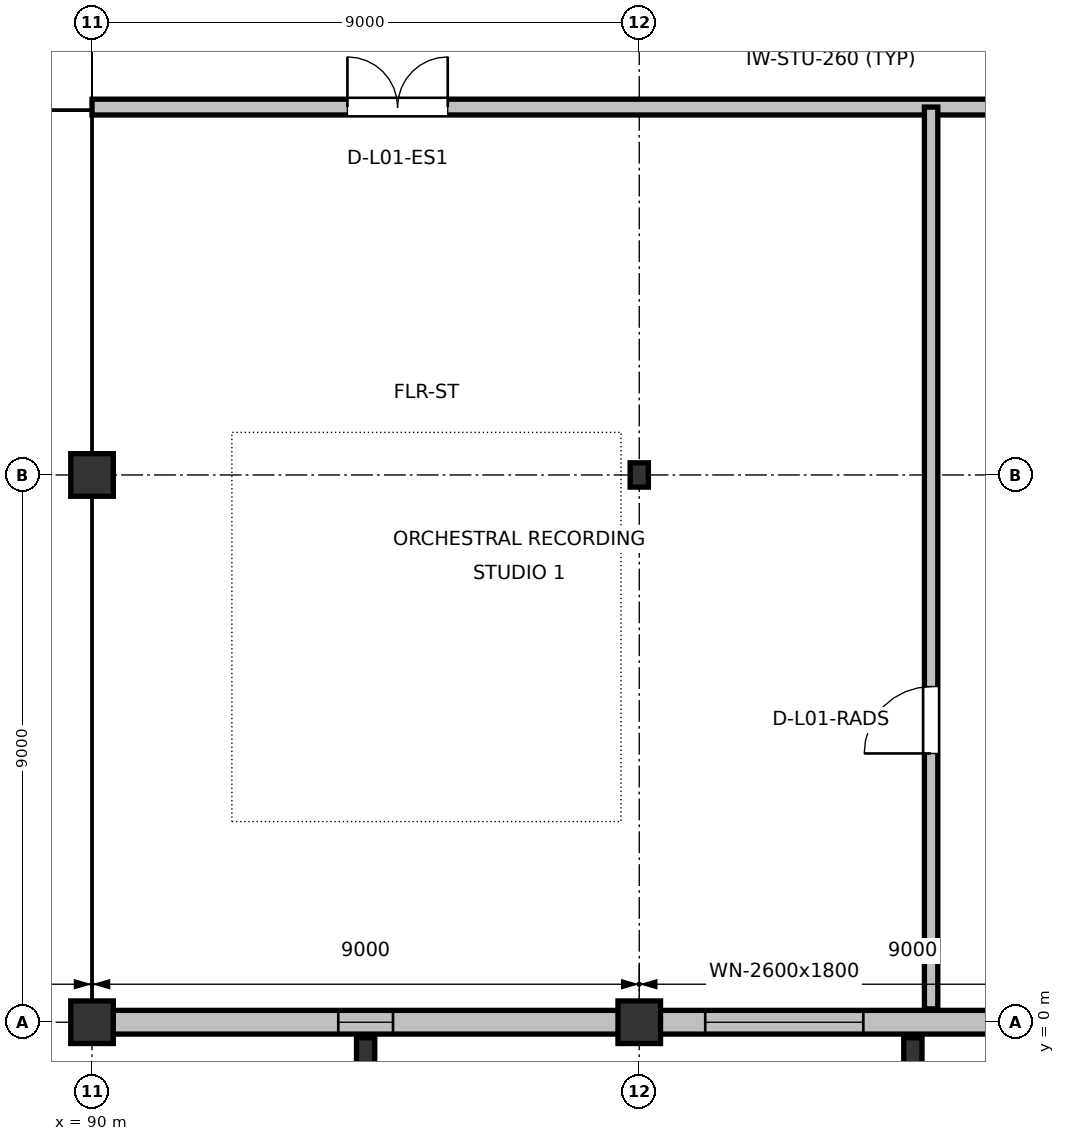
"""IFC4 building model, lengths in metres.
Left out: names, types, materials, properties, quantities, classifications, styles, units other than length and angle.
Written with IfcOpenShell. Run it as: python <this file> out.ifc"""

import sys

from ifc_helpers import new_model, si_unit, direction, frame, frame_2d, origin, origin_2d, place, context, subcontext, project, spatial, rectangle, i_section, extrude, element, fill, save


model = new_model("IFC4")
c1 = context("Model", 3, precision=1e-05, world=origin(), true_north=direction((0.0, 1.0)))
c2 = subcontext(c1, "Body", "Model", "MODEL_VIEW")
j1 = project(units=[si_unit("LENGTHUNIT", "METRE"), si_unit("PLANEANGLEUNIT", "RADIAN")], contexts=[c1])
p1 = place(None, origin())
s1 = spatial("IfcSite", under=j1, at=p1, CompositionType="ELEMENT")
p2 = place(p1, origin())
s2 = spatial("IfcBuilding", under=s1, at=p2, CompositionType="ELEMENT")
p3 = place(p2, frame((0.0, 0.0, 5.4)))
s3 = spatial("IfcBuildingStorey", under=s2, at=p3, CompositionType="ELEMENT", Elevation=5.4)
for number, where, z_axis, x_axis in (
    (1, (94.5, -0.48, 0.0), (0.0, 0.0, 1.0), (1.0, 0.0, 0.0)),
    (2, (103.5, -0.48, 0.0), (0.0, 0.0, 1.0), (1.0, 0.0, 0.0)),
):
    element("IfcColumn", number, at=place(p3, frame(where, z_axis=z_axis, x_axis=x_axis)), inside=s3, PredefinedType="PILASTER", context=c2, shape_type="SweptSolid", body=[
        extrude(rectangle(XDim=0.3, YDim=0.45, at=origin_2d()), origin(), (0.0, 0.0, 1.0), 4.8),
    ])
for number, where, z_axis, x_axis in (
    (3, (90.0, 0.0, 0.0), (0.0, 0.0, 1.0), (1.0, 0.0, 0.0)),
    (4, (90.0, 9.0, 0.0), (0.0, 0.0, 1.0), (1.0, 0.0, 0.0)),
    (5, (99.0, 0.0, 0.0), (0.0, 0.0, 1.0), (1.0, 0.0, 0.0)),
):
    element("IfcColumn", number, at=place(p3, frame(where, z_axis=z_axis, x_axis=x_axis)), inside=s3, PredefinedType="COLUMN", context=c2, shape_type="SweptSolid", body=[
        extrude(rectangle(XDim=0.7, YDim=0.7, at=origin_2d()), origin(), (0.0, 0.0, 1.0), 4.8),
    ])
p4 = place(p3, frame((99.0, 9.0, 0.0), z_axis=(0.0, 0.0, 1.0), x_axis=(1.0, 0.0, 0.0)))
e6 = element("IfcColumn", 6, at=p4, inside=s3, PredefinedType="COLUMN", context=c2, shape_type="SweptSolid", body=[
    extrude(i_section(OverallWidth=0.3, OverallDepth=0.4, WebThickness=0.013, FlangeThickness=0.024, at=origin_2d()), origin(), (0.0, 0.0, 1.0), 4.8),
])
p5 = place(p3, frame((90.335, 0.0, 0.0), z_axis=(0.0, 0.0, 1.0), x_axis=(1.0, 0.0, 0.0)))
e7 = element("IfcWall", 7, at=p5, inside=s3, PredefinedType="STANDARD", context=c2, shape_type="SweptSolid", body=[
    extrude(rectangle(XDim=8.33, YDim=0.39, at=frame_2d((4.165, 0.0))), origin(), (0.0, 0.0, 1.0), 4.195),
])
p6 = place(p5, frame((3.715, 0.0, 0.9)))
e8 = element("IfcOpeningElement", 8, at=p6, cuts=e7, PredefinedType="OPENING", context=c2, shape_type="SweptSolid", body=[
    extrude(rectangle(XDim=0.9, YDim=1.65, at=frame_2d((0.45, 0.825))), frame((0.0, 0.205, 0.0), z_axis=(0.0, -1.0, 0.0), x_axis=(1.0, 0.0, 0.0)), (0.0, 0.0, 1.0), 0.41),
])
p7 = place(p3, frame((99.335, 0.0, 0.0), z_axis=(0.0, 0.0, 1.0), x_axis=(1.0, 0.0, 0.0)))
e9 = element("IfcWall", 9, at=p7, inside=s3, PredefinedType="STANDARD", context=c2, shape_type="SweptSolid", body=[
    extrude(rectangle(XDim=8.33, YDim=0.39, at=frame_2d((4.165, 0.0))), origin(), (0.0, 0.0, 1.0), 4.195),
])
p8 = place(p7, frame((0.75, 0.0, 0.9)))
e10 = element("IfcOpeningElement", 10, at=p8, cuts=e9, PredefinedType="OPENING", context=c2, shape_type="SweptSolid", body=[
    extrude(rectangle(XDim=2.6, YDim=1.8, at=frame_2d((1.3, 0.9))), frame((0.0, 0.205, 0.0), z_axis=(0.0, -1.0, 0.0), x_axis=(1.0, 0.0, 0.0)), (0.0, 0.0, 1.0), 0.41),
])
p9 = place(p3, frame((90.0, 15.05, 0.0), z_axis=(0.0, 0.0, 1.0), x_axis=(1.0, 0.0, 0.0)))
e11 = element("IfcWall", 11, at=p9, inside=s3, PredefinedType="PARTITIONING", context=c2, shape_type="SweptSolid", body=[
    extrude(rectangle(XDim=24.3, YDim=0.26, at=frame_2d((12.15, 0.0))), origin(), (0.0, 0.0, 1.0), 4.185),
])
p10 = place(p9, frame((4.2, 0.0, 0.0)))
e12 = element("IfcOpeningElement", 12, at=p10, cuts=e11, PredefinedType="OPENING", context=c2, shape_type="SweptSolid", body=[
    extrude(rectangle(XDim=1.65, YDim=2.25, at=frame_2d((0.825, 1.125))), frame((0.0, 0.14, 0.0), z_axis=(0.0, -1.0, 0.0), x_axis=(1.0, 0.0, 0.0)), (0.0, 0.0, 1.0), 0.28),
])
p11 = place(p9, frame((16.5, 0.0, 0.0)))
e13 = element("IfcOpeningElement", 13, at=p11, cuts=e11, PredefinedType="OPENING", context=c2, shape_type="SweptSolid", body=[
    extrude(rectangle(XDim=1.45, YDim=2.22, at=frame_2d((0.725, 1.11))), frame((0.0, 0.14, 0.0), z_axis=(0.0, -1.0, 0.0), x_axis=(1.0, 0.0, 0.0)), (0.0, 0.0, 1.0), 0.28),
])
p12 = place(p3, frame((103.8, 0.22, 0.0), z_axis=(0.0, 0.0, 1.0), x_axis=(0.0, 1.0, 0.0)))
e14 = element("IfcWall", 14, at=p12, inside=s3, PredefinedType="PARTITIONING", context=c2, shape_type="SweptSolid", body=[
    extrude(rectangle(XDim=14.83, YDim=0.22, at=frame_2d((7.415, 0.0))), origin(), (0.0, 0.0, 1.0), 4.56),
])
p13 = place(p12, frame((4.2, 0.0, 0.0)))
e15 = element("IfcOpeningElement", 15, at=p13, cuts=e14, PredefinedType="OPENING", context=c2, shape_type="SweptSolid", body=[
    extrude(rectangle(XDim=1.1, YDim=2.16, at=frame_2d((0.55, 1.08))), frame((0.0, 0.12, 0.0), z_axis=(0.0, -1.0, 0.0), x_axis=(1.0, 0.0, 0.0)), (0.0, 0.0, 1.0), 0.24),
])
p14 = place(p6, origin())
e16 = element("IfcWindow", 16, at=p14, inside=s3, PartitioningType="SINGLE_PANEL", PredefinedType="WINDOW", context=c2, shape_type="SweptSolid", body=[
    extrude(rectangle(XDim=0.9, YDim=1.65, at=frame_2d((0.45, 0.825))), frame((0.0, 0.03, 0.0), z_axis=(0.0, -1.0, 0.0), x_axis=(1.0, 0.0, 0.0)), (0.0, 0.0, 1.0), 0.06),
])
fill(e8, e16)
p15 = place(p8, origin())
e17 = element("IfcWindow", 17, at=p15, inside=s3, PartitioningType="SINGLE_PANEL", PredefinedType="WINDOW", context=c2, shape_type="SweptSolid", body=[
    extrude(rectangle(XDim=2.6, YDim=1.8, at=frame_2d((1.3, 0.9))), frame((0.0, 0.03, 0.0), z_axis=(0.0, -1.0, 0.0), x_axis=(1.0, 0.0, 0.0)), (0.0, 0.0, 1.0), 0.06),
])
fill(e10, e17)
p16 = place(p10, origin())
e18 = element("IfcDoor", 18, at=p16, inside=s3, OperationType="DOUBLE_DOOR_SINGLE_SWING", PredefinedType="DOOR", context=c2, shape_type="SweptSolid", body=[
    extrude(rectangle(XDim=1.65, YDim=2.25, at=frame_2d((0.825, 1.125))), frame((0.0, 0.025, 0.0), z_axis=(0.0, -1.0, 0.0), x_axis=(1.0, 0.0, 0.0)), (0.0, 0.0, 1.0), 0.05),
])
fill(e12, e18)
p17 = place(p13, origin())
e19 = element("IfcDoor", 19, at=p17, inside=s3, OperationType="SINGLE_SWING_LEFT", PredefinedType="DOOR", context=c2, shape_type="SweptSolid", body=[
    extrude(rectangle(XDim=1.1, YDim=2.16, at=frame_2d((0.55, 1.08))), frame((0.0, 0.025, 0.0), z_axis=(0.0, -1.0, 0.0), x_axis=(1.0, 0.0, 0.0)), (0.0, 0.0, 1.0), 0.05),
])
fill(e15, e19)
save(model, sys.argv[1])
